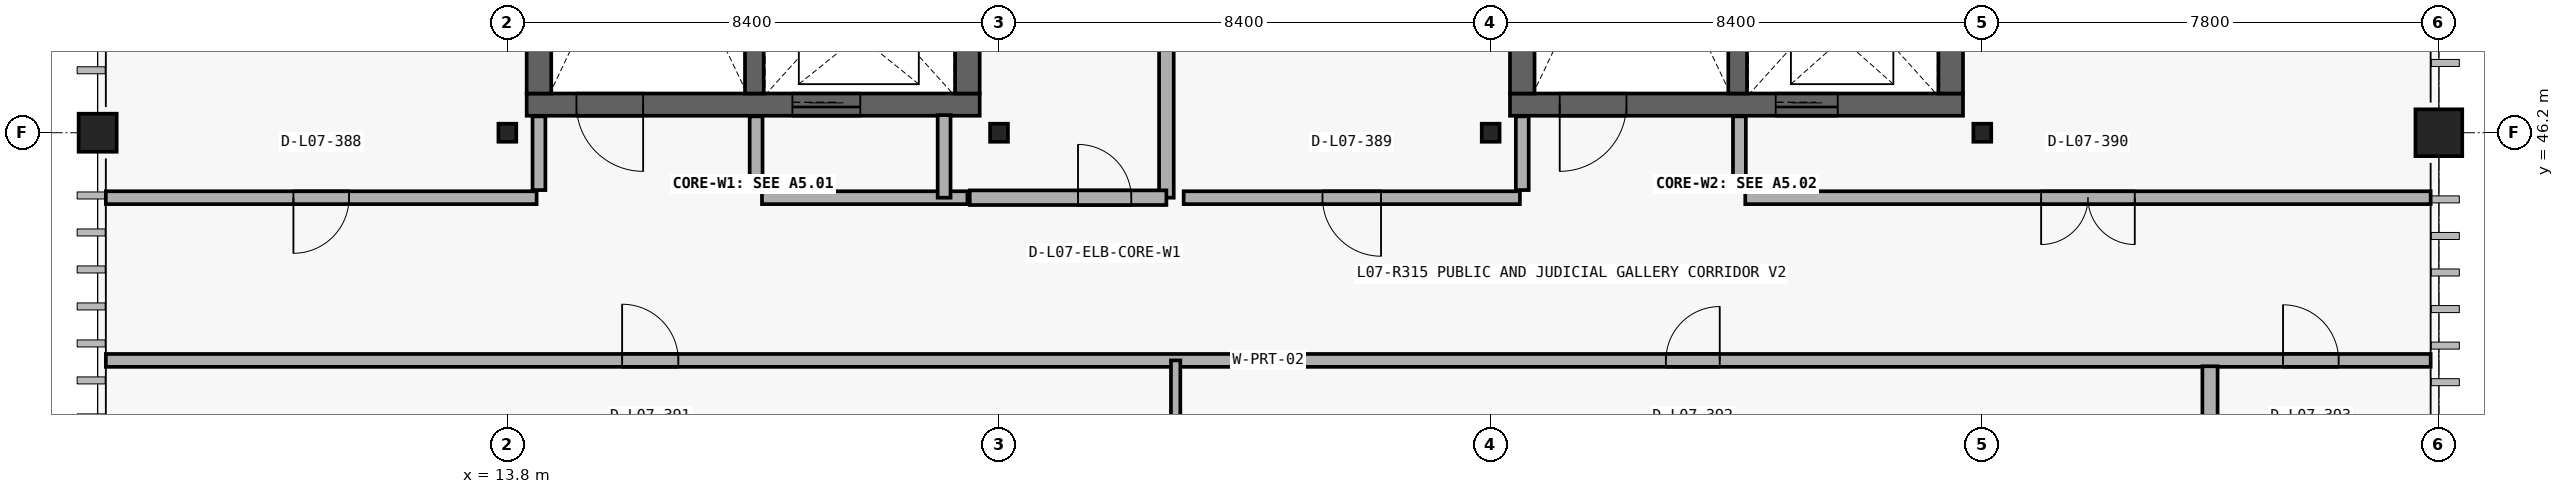
"""IFC4 building model, lengths in metres.
Left out: names, types, materials, properties, quantities, classifications, styles, units other than length and angle.
Written with IfcOpenShell. Run it as: python <this file> out.ifc"""

import sys

from ifc_helpers import new_model, si_unit, direction, frame, frame_2d, origin_with_axes, origin_2d_with_axis, place, context, subcontext, project, spatial, rectangle, circle, i_section, extrude, element, fill, save


model = new_model("IFC4")
c1 = context("Model", 3, precision=1e-05, world=origin_with_axes(), true_north=direction((0.0, 1.0)))
c2 = subcontext(c1, "Body", "Model", "MODEL_VIEW")
j1 = project(units=[si_unit("LENGTHUNIT", "METRE"), si_unit("PLANEANGLEUNIT", "RADIAN")], contexts=[c1])
p1 = place(None, origin_with_axes())
s1 = spatial("IfcSite", under=j1, at=p1, CompositionType="ELEMENT")
p2 = place(p1, origin_with_axes())
s2 = spatial("IfcBuilding", under=s1, at=p2, CompositionType="ELEMENT")
p3 = place(p2, frame((0.0, 0.0, 34.5), z_axis=(0.0, 0.0, 1.0), x_axis=(1.0, 0.0, 0.0)))
s3 = spatial("IfcBuildingStorey", under=s2, at=p3, CompositionType="ELEMENT", Elevation=34.5)
p4 = place(None, frame((14.13, 46.68, 34.5), z_axis=(0.0, 0.0, 1.0), x_axis=(1.0, 0.0, 0.0)))
e1 = element("IfcWall", 1, at=p4, inside=s3, PredefinedType="SHEAR", context=c2, shape_type="SweptSolid", body=[
    extrude(rectangle(XDim=7.74, YDim=0.38, at=frame_2d((3.87, 0.0), x_axis=(1.0, 0.0))), origin_with_axes(), (0.0, 0.0, 1.0), 4.5),
])
p5 = place(None, frame((15.55, 46.68, 34.5), z_axis=(0.0, 0.0, 1.0), x_axis=(1.0, 0.0, 0.0)))
e2 = element("IfcOpeningElement", 2, at=p5, cuts=e1, PredefinedType="OPENING", context=c2, shape_type="SweptSolid", body=[
    extrude(rectangle(XDim=1.14, YDim=2.18, at=frame_2d((0.0, 1.09), x_axis=(1.0, 0.0))), frame((0.0, 0.2, 0.0), z_axis=(0.0, -1.0, 0.0), x_axis=(1.0, 0.0, 0.0)), (0.0, 0.0, 1.0), 0.4),
])
p6 = place(None, frame((19.25, 46.68, 34.5), z_axis=(0.0, 0.0, 1.0), x_axis=(1.0, 0.0, 0.0)))
e3 = element("IfcOpeningElement", 3, at=p6, cuts=e1, PredefinedType="OPENING", context=c2, shape_type="SweptSolid", body=[
    extrude(rectangle(XDim=1.16, YDim=2.2, at=frame_2d((0.0, 1.1), x_axis=(1.0, 0.0))), frame((0.0, 0.2, 0.0), z_axis=(0.0, -1.0, 0.0), x_axis=(1.0, 0.0, 0.0)), (0.0, 0.0, 1.0), 0.4),
])
p7 = place(None, frame((21.66, 46.87, 34.5), z_axis=(0.0, 0.0, 1.0), x_axis=(0.0, 1.0, 0.0)))
e4 = element("IfcWall", 4, at=p7, inside=s3, PredefinedType="SHEAR", context=c2, shape_type="SweptSolid", body=[
    extrude(rectangle(XDim=7.06, YDim=0.42, at=frame_2d((3.53, 0.0), x_axis=(1.0, 0.0))), origin_with_axes(), (0.0, 0.0, 1.0), 4.5),
])
p8 = place(None, frame((21.66, 52.66, 34.5), z_axis=(0.0, 0.0, 1.0), x_axis=(0.0, 1.0, 0.0)))
e5 = element("IfcOpeningElement", 5, at=p8, cuts=e4, PredefinedType="OPENING", context=c2, shape_type="SweptSolid", body=[
    extrude(rectangle(XDim=1.16, YDim=2.2, at=frame_2d((0.0, 1.1), x_axis=(1.0, 0.0))), frame((0.0, 0.22, 0.0), z_axis=(0.0, -1.0, 0.0), x_axis=(1.0, 0.0, 0.0)), (0.0, 0.0, 1.0), 0.44),
])
p9 = place(None, frame((14.34, 53.93, 34.5), z_axis=(0.0, 0.0, 1.0), x_axis=(0.0, -1.0, 0.0)))
e6 = element("IfcWall", 6, at=p9, inside=s3, PredefinedType="SHEAR", context=c2, shape_type="SweptSolid", body=[
    extrude(rectangle(XDim=7.06, YDim=0.42, at=frame_2d((3.53, 0.0), x_axis=(1.0, 0.0))), origin_with_axes(), (0.0, 0.0, 1.0), 4.5),
])
p10 = place(None, frame((18.02, 46.87, 34.5), z_axis=(0.0, 0.0, 1.0), x_axis=(0.0, 1.0, 0.0)))
e7 = element("IfcWall", 7, at=p10, inside=s3, PredefinedType="SHEAR", context=c2, shape_type="SweptSolid", body=[
    extrude(rectangle(XDim=7.06, YDim=0.32, at=frame_2d((3.53, 0.0), x_axis=(1.0, 0.0))), origin_with_axes(), (0.0, 0.0, 1.0), 4.5),
])
p11 = place(None, frame((25.06, 45.09, 34.5), z_axis=(0.0, 0.0, 1.0), x_axis=(0.0, 1.0, 0.0)))
e8 = element("IfcWall", 8, at=p11, inside=s3, PredefinedType="PARTITIONING", context=c2, shape_type="SweptSolid", body=[
    extrude(rectangle(XDim=9.03, YDim=0.25, at=frame_2d((4.515, 0.0), x_axis=(1.0, 0.0))), origin_with_axes(), (0.0, 0.0, 1.0), 4.14),
])
p12 = place(None, frame((21.7, 45.09, 34.5), z_axis=(0.0, 0.0, 1.0), x_axis=(1.0, 0.0, 0.0)))
e9 = element("IfcWall", 9, at=p12, inside=s3, PredefinedType="PARTITIONING", context=c2, shape_type="SweptSolid", body=[
    extrude(rectangle(XDim=3.36, YDim=0.25, at=frame_2d((1.68, 0.0), x_axis=(1.0, 0.0))), origin_with_axes(), (0.0, 0.0, 1.0), 4.14),
])
p13 = place(None, frame((24.005, 45.09, 34.5), z_axis=(0.0, 0.0, 1.0), x_axis=(1.0, 0.0, 0.0)))
e10 = element("IfcOpeningElement", 10, at=p13, cuts=e9, PredefinedType="OPENING", context=c2, shape_type="SweptSolid", body=[
    extrude(rectangle(XDim=0.91, YDim=2.12, at=frame_2d((0.0, 1.06), x_axis=(1.0, 0.0))), frame((0.0, 0.135, 0.0), z_axis=(0.0, -1.0, 0.0), x_axis=(1.0, 0.0, 0.0)), (0.0, 0.0, 1.0), 0.27),
])
p14 = place(None, frame((30.93, 46.68, 34.5), z_axis=(0.0, 0.0, 1.0), x_axis=(1.0, 0.0, 0.0)))
e11 = element("IfcWall", 11, at=p14, inside=s3, PredefinedType="SHEAR", context=c2, shape_type="SweptSolid", body=[
    extrude(rectangle(XDim=7.74, YDim=0.38, at=frame_2d((3.87, 0.0), x_axis=(1.0, 0.0))), origin_with_axes(), (0.0, 0.0, 1.0), 4.5),
])
p15 = place(None, frame((32.35, 46.68, 34.5), z_axis=(0.0, 0.0, 1.0), x_axis=(1.0, 0.0, 0.0)))
e12 = element("IfcOpeningElement", 12, at=p15, cuts=e11, PredefinedType="OPENING", context=c2, shape_type="SweptSolid", body=[
    extrude(rectangle(XDim=1.14, YDim=2.18, at=frame_2d((0.0, 1.09), x_axis=(1.0, 0.0))), frame((0.0, 0.2, 0.0), z_axis=(0.0, -1.0, 0.0), x_axis=(1.0, 0.0, 0.0)), (0.0, 0.0, 1.0), 0.4),
])
p16 = place(None, frame((36.0, 46.68, 34.5), z_axis=(0.0, 0.0, 1.0), x_axis=(1.0, 0.0, 0.0)))
e13 = element("IfcOpeningElement", 13, at=p16, cuts=e11, PredefinedType="OPENING", context=c2, shape_type="SweptSolid", body=[
    extrude(rectangle(XDim=1.06, YDim=2.16, at=frame_2d((0.0, 1.08), x_axis=(1.0, 0.0))), frame((0.0, 0.2, 0.0), z_axis=(0.0, -1.0, 0.0), x_axis=(1.0, 0.0, 0.0)), (0.0, 0.0, 1.0), 0.4),
])
for number, where, z_axis, x_axis in (
    (14, (38.46, 46.87, 34.5), (0.0, 0.0, 1.0), (0.0, 1.0, 0.0)),
    (15, (31.14, 53.93, 34.5), (0.0, 0.0, 1.0), (0.0, -1.0, 0.0)),
):
    element("IfcWall", number, at=place(None, frame(where, z_axis=z_axis, x_axis=x_axis)), inside=s3, PredefinedType="SHEAR", context=c2, shape_type="SweptSolid", body=[
        extrude(rectangle(XDim=7.06, YDim=0.42, at=frame_2d((3.53, 0.0), x_axis=(1.0, 0.0))), origin_with_axes(), (0.0, 0.0, 1.0), 4.5),
    ])
p17 = place(None, frame((34.82, 46.87, 34.5), z_axis=(0.0, 0.0, 1.0), x_axis=(0.0, 1.0, 0.0)))
e16 = element("IfcWall", 16, at=p17, inside=s3, PredefinedType="SHEAR", context=c2, shape_type="SweptSolid", body=[
    extrude(rectangle(XDim=7.06, YDim=0.32, at=frame_2d((3.53, 0.0), x_axis=(1.0, 0.0))), origin_with_axes(), (0.0, 0.0, 1.0), 4.5),
])
for number, where, z_axis, x_axis in (
    (17, (14.34, 45.22, 34.5), (0.0, 0.0, 1.0), (0.0, 1.0, 0.0)),
    (18, (18.05, 45.22, 34.5), (0.0, 0.0, 1.0), (0.0, 1.0, 0.0)),
    (19, (31.14, 45.22, 34.5), (0.0, 0.0, 1.0), (0.0, 1.0, 0.0)),
    (20, (34.85, 45.22, 34.5), (0.0, 0.0, 1.0), (0.0, 1.0, 0.0)),
):
    element("IfcWall", number, at=place(None, frame(where, z_axis=z_axis, x_axis=x_axis)), inside=s3, PredefinedType="PARTITIONING", context=c2, shape_type="SweptSolid", body=[
        extrude(rectangle(XDim=1.26, YDim=0.22, at=frame_2d((0.63, 0.0), x_axis=(1.0, 0.0))), origin_with_axes(), (0.0, 0.0, 1.0), 4.14),
    ])
p18 = place(None, frame((6.94, 45.09, 34.5), z_axis=(0.0, 0.0, 1.0), x_axis=(1.0, 0.0, 0.0)))
e21 = element("IfcWall", 21, at=p18, inside=s3, PredefinedType="PARTITIONING", context=c2, shape_type="SweptSolid", body=[
    extrude(rectangle(XDim=7.36, YDim=0.22, at=frame_2d((3.68, 0.0), x_axis=(1.0, 0.0))), origin_with_axes(), (0.0, 0.0, 1.0), 4.14),
])
p19 = place(None, frame((10.62, 45.09, 34.5), z_axis=(0.0, 0.0, 1.0), x_axis=(1.0, 0.0, 0.0)))
e22 = element("IfcOpeningElement", 22, at=p19, cuts=e21, PredefinedType="OPENING", context=c2, shape_type="SweptSolid", body=[
    extrude(rectangle(XDim=0.95, YDim=2.16, at=frame_2d((0.0, 1.08), x_axis=(1.0, 0.0))), frame((0.0, 0.12, 0.0), z_axis=(0.0, -1.0, 0.0), x_axis=(1.0, 0.0, 0.0)), (0.0, 0.0, 1.0), 0.24),
])
p20 = place(None, frame((18.15, 45.09, 34.5), z_axis=(0.0, 0.0, 1.0), x_axis=(1.0, 0.0, 0.0)))
e23 = element("IfcWall", 23, at=p20, inside=s3, PredefinedType="PARTITIONING", context=c2, shape_type="SweptSolid", body=[
    extrude(rectangle(XDim=3.51, YDim=0.22, at=frame_2d((1.755, 0.0), x_axis=(1.0, 0.0))), origin_with_axes(), (0.0, 0.0, 1.0), 4.14),
])
p21 = place(None, frame((25.355, 45.09, 34.5), z_axis=(0.0, 0.0, 1.0), x_axis=(1.0, 0.0, 0.0)))
e24 = element("IfcWall", 24, at=p21, inside=s3, PredefinedType="PARTITIONING", context=c2, shape_type="SweptSolid", body=[
    extrude(rectangle(XDim=5.745, YDim=0.22, at=frame_2d((2.873, 0.0), x_axis=(1.0, 0.0))), origin_with_axes(), (0.0, 0.0, 1.0), 4.14),
])
p22 = place(None, frame((28.227, 45.09, 34.5), z_axis=(0.0, 0.0, 1.0), x_axis=(1.0, 0.0, 0.0)))
e25 = element("IfcOpeningElement", 25, at=p22, cuts=e24, PredefinedType="OPENING", context=c2, shape_type="SweptSolid", body=[
    extrude(rectangle(XDim=1.0, YDim=2.28, at=frame_2d((0.0, 1.14), x_axis=(1.0, 0.0))), frame((0.0, 0.12, 0.0), z_axis=(0.0, -1.0, 0.0), x_axis=(1.0, 0.0, 0.0)), (0.0, 0.0, 1.0), 0.24),
])
p23 = place(None, frame((34.95, 45.09, 34.5), z_axis=(0.0, 0.0, 1.0), x_axis=(1.0, 0.0, 0.0)))
e26 = element("IfcWall", 26, at=p23, inside=s3, PredefinedType="PARTITIONING", context=c2, shape_type="SweptSolid", body=[
    extrude(rectangle(XDim=11.71, YDim=0.22, at=frame_2d((5.855, 0.0), x_axis=(1.0, 0.0))), origin_with_axes(), (0.0, 0.0, 1.0), 4.14),
])
p24 = place(None, frame((40.805, 45.09, 34.5), z_axis=(0.0, 0.0, 1.0), x_axis=(1.0, 0.0, 0.0)))
e27 = element("IfcOpeningElement", 27, at=p24, cuts=e26, PredefinedType="OPENING", context=c2, shape_type="SweptSolid", body=[
    extrude(rectangle(XDim=1.6, YDim=2.32, at=frame_2d((0.0, 1.16), x_axis=(1.0, 0.0))), frame((0.0, 0.12, 0.0), z_axis=(0.0, -1.0, 0.0), x_axis=(1.0, 0.0, 0.0)), (0.0, 0.0, 1.0), 0.24),
])
p25 = place(None, frame((6.94, 42.31, 34.5), z_axis=(0.0, 0.0, 1.0), x_axis=(1.0, 0.0, 0.0)))
e28 = element("IfcWall", 28, at=p25, inside=s3, PredefinedType="PARTITIONING", context=c2, shape_type="SweptSolid", body=[
    extrude(rectangle(XDim=39.72, YDim=0.22, at=frame_2d((19.86, 0.0), x_axis=(1.0, 0.0))), origin_with_axes(), (0.0, 0.0, 1.0), 4.14),
])
p26 = place(None, frame((16.241, 42.31, 34.5), z_axis=(0.0, 0.0, 1.0), x_axis=(1.0, 0.0, 0.0)))
e29 = element("IfcOpeningElement", 29, at=p26, cuts=e28, PredefinedType="OPENING", context=c2, shape_type="SweptSolid", body=[
    extrude(rectangle(XDim=0.96, YDim=2.2, at=frame_2d((0.0, 1.1), x_axis=(1.0, 0.0))), frame((0.0, 0.12, 0.0), z_axis=(0.0, -1.0, 0.0), x_axis=(1.0, 0.0, 0.0)), (0.0, 0.0, 1.0), 0.24),
])
p27 = place(None, frame((34.054, 42.31, 34.5), z_axis=(0.0, 0.0, 1.0), x_axis=(1.0, 0.0, 0.0)))
e30 = element("IfcOpeningElement", 30, at=p27, cuts=e28, PredefinedType="OPENING", context=c2, shape_type="SweptSolid", body=[
    extrude(rectangle(XDim=0.92, YDim=2.14, at=frame_2d((0.0, 1.07), x_axis=(1.0, 0.0))), frame((0.0, 0.12, 0.0), z_axis=(0.0, -1.0, 0.0), x_axis=(1.0, 0.0, 0.0)), (0.0, 0.0, 1.0), 0.24),
])
p28 = place(None, frame((44.613, 42.31, 34.5), z_axis=(0.0, 0.0, 1.0), x_axis=(1.0, 0.0, 0.0)))
e31 = element("IfcOpeningElement", 31, at=p28, cuts=e28, PredefinedType="OPENING", context=c2, shape_type="SweptSolid", body=[
    extrude(rectangle(XDim=0.95, YDim=2.1, at=frame_2d((0.0, 1.05), x_axis=(1.0, 0.0))), frame((0.0, 0.12, 0.0), z_axis=(0.0, -1.0, 0.0), x_axis=(1.0, 0.0, 0.0)), (0.0, 0.0, 1.0), 0.24),
])
p29 = place(None, frame((42.89, 39.18, 34.5), z_axis=(0.0, 0.0, 1.0), x_axis=(0.0, 1.0, 0.0)))
e32 = element("IfcWall", 32, at=p29, inside=s3, PredefinedType="PLUMBINGWALL", context=c2, shape_type="SweptSolid", body=[
    extrude(rectangle(XDim=3.03, YDim=0.26, at=frame_2d((1.515, 0.0), x_axis=(1.0, 0.0))), origin_with_axes(), (0.0, 0.0, 1.0), 4.14),
])
p30 = place(None, frame((21.262, 45.09, 34.5), z_axis=(0.0, 0.0, 1.0), x_axis=(0.0, 1.0, 0.0)))
e33 = element("IfcWall", 33, at=p30, inside=s3, PredefinedType="PARTITIONING", context=c2, shape_type="SweptSolid", body=[
    extrude(rectangle(XDim=1.41, YDim=0.22, at=frame_2d((0.705, 0.0), x_axis=(1.0, 0.0))), origin_with_axes(), (0.0, 0.0, 1.0), 4.14),
])
p31 = place(None, frame((25.218, 39.14, 34.5), z_axis=(0.0, 0.0, 1.0), x_axis=(0.0, 1.0, 0.0)))
e34 = element("IfcWall", 34, at=p31, inside=s3, PredefinedType="PARTITIONING", context=c2, shape_type="SweptSolid", body=[
    extrude(rectangle(XDim=3.17, YDim=0.16, at=frame_2d((1.585, 0.0), x_axis=(1.0, 0.0))), origin_with_axes(), (0.0, 0.0, 1.0), 4.14),
])
p32 = place(None, frame((6.8, 46.2, 34.5), z_axis=(0.0, 0.0, 1.0), x_axis=(1.0, 0.0, 0.0)))
e35 = element("IfcColumn", 35, at=p32, inside=s3, PredefinedType="COLUMN", context=c2, shape_type="SweptSolid", body=[
    extrude(circle(Radius=0.325, at=origin_2d_with_axis()), origin_with_axes(), (0.0, 0.0, 1.0), 4.5),
])
for number, where, z_axis, x_axis in (
    (36, (13.8, 46.2, 34.5), (0.0, 0.0, 1.0), (1.0, 0.0, 0.0)),
    (37, (22.2, 46.2, 34.5), (0.0, 0.0, 1.0), (1.0, 0.0, 0.0)),
    (38, (30.6, 46.2, 34.5), (0.0, 0.0, 1.0), (1.0, 0.0, 0.0)),
    (39, (39.0, 46.2, 34.5), (0.0, 0.0, 1.0), (1.0, 0.0, 0.0)),
):
    element("IfcColumn", number, at=place(None, frame(where, z_axis=z_axis, x_axis=x_axis)), inside=s3, PredefinedType="COLUMN", context=c2, shape_type="SweptSolid", body=[
        extrude(i_section(OverallWidth=0.305, OverallDepth=0.308, WebThickness=0.01, FlangeThickness=0.015, at=origin_2d_with_axis()), origin_with_axes(), (0.0, 0.0, 1.0), 4.5),
    ])
p33 = place(None, frame((46.8, 46.2, 34.5), z_axis=(0.0, 0.0, 1.0), x_axis=(1.0, 0.0, 0.0)))
e40 = element("IfcColumn", 40, at=p33, inside=s3, PredefinedType="COLUMN", context=c2, shape_type="SweptSolid", body=[
    extrude(circle(Radius=0.4, at=origin_2d_with_axis()), origin_with_axes(), (0.0, 0.0, 1.0), 4.5),
])
p34 = place(None, frame((15.55, 46.68, 34.5), z_axis=(0.0, 0.0, 1.0), x_axis=(-1.0, 0.0, 0.0)))
e41 = element("IfcDoor", 41, at=p34, inside=s3, OperationType="SINGLE_SWING_RIGHT", PredefinedType="DOOR", context=c2, shape_type="SweptSolid", body=[
    extrude(rectangle(XDim=1.14, YDim=2.18, at=frame_2d((0.0, 1.09), x_axis=(1.0, 0.0))), frame((0.0, 0.04, 0.0), z_axis=(0.0, -1.0, 0.0), x_axis=(1.0, 0.0, 0.0)), (0.0, 0.0, 1.0), 0.08),
])
fill(e2, e41)
p35 = place(None, frame((19.25, 46.68, 34.5), z_axis=(0.0, 0.0, 1.0), x_axis=(-1.0, 0.0, 0.0)))
e42 = element("IfcDoor", 42, at=p35, inside=s3, OperationType="SLIDING_TO_LEFT", PredefinedType="DOOR", context=c2, shape_type="SweptSolid", body=[
    extrude(rectangle(XDim=1.16, YDim=2.2, at=frame_2d((0.0, 1.1), x_axis=(1.0, 0.0))), frame((0.0, 0.04, 0.0), z_axis=(0.0, -1.0, 0.0), x_axis=(1.0, 0.0, 0.0)), (0.0, 0.0, 1.0), 0.08),
])
fill(e3, e42)
p36 = place(None, frame((24.005, 45.09, 34.5), z_axis=(0.0, 0.0, 1.0), x_axis=(1.0, 0.0, 0.0)))
e43 = element("IfcDoor", 43, at=p36, inside=s3, OperationType="SINGLE_SWING_LEFT", PredefinedType="DOOR", context=c2, shape_type="SweptSolid", body=[
    extrude(rectangle(XDim=0.91, YDim=2.12, at=frame_2d((0.0, 1.06), x_axis=(1.0, 0.0))), frame((0.0, 0.04, 0.0), z_axis=(0.0, -1.0, 0.0), x_axis=(1.0, 0.0, 0.0)), (0.0, 0.0, 1.0), 0.08),
])
fill(e10, e43)
p37 = place(None, frame((32.35, 46.68, 34.5), z_axis=(0.0, 0.0, 1.0), x_axis=(-1.0, 0.0, 0.0)))
e44 = element("IfcDoor", 44, at=p37, inside=s3, OperationType="SINGLE_SWING_LEFT", PredefinedType="DOOR", context=c2, shape_type="SweptSolid", body=[
    extrude(rectangle(XDim=1.14, YDim=2.18, at=frame_2d((0.0, 1.09), x_axis=(1.0, 0.0))), frame((0.0, 0.04, 0.0), z_axis=(0.0, -1.0, 0.0), x_axis=(1.0, 0.0, 0.0)), (0.0, 0.0, 1.0), 0.08),
])
fill(e12, e44)
p38 = place(None, frame((36.0, 46.68, 34.5), z_axis=(0.0, 0.0, 1.0), x_axis=(-1.0, 0.0, 0.0)))
e45 = element("IfcDoor", 45, at=p38, inside=s3, OperationType="SLIDING_TO_LEFT", PredefinedType="DOOR", context=c2, shape_type="SweptSolid", body=[
    extrude(rectangle(XDim=1.06, YDim=2.16, at=frame_2d((0.0, 1.08), x_axis=(1.0, 0.0))), frame((0.0, 0.04, 0.0), z_axis=(0.0, -1.0, 0.0), x_axis=(1.0, 0.0, 0.0)), (0.0, 0.0, 1.0), 0.08),
])
fill(e13, e45)
p39 = place(None, frame((10.62, 45.09, 34.5), z_axis=(0.0, 0.0, 1.0), x_axis=(-1.0, 0.0, 0.0)))
e46 = element("IfcDoor", 46, at=p39, inside=s3, OperationType="SINGLE_SWING_LEFT", PredefinedType="DOOR", context=c2, shape_type="SweptSolid", body=[
    extrude(rectangle(XDim=0.95, YDim=2.16, at=frame_2d((0.0, 1.08), x_axis=(1.0, 0.0))), frame((0.0, 0.04, 0.0), z_axis=(0.0, -1.0, 0.0), x_axis=(1.0, 0.0, 0.0)), (0.0, 0.0, 1.0), 0.08),
])
fill(e22, e46)
p40 = place(None, frame((28.227, 45.09, 34.5), z_axis=(0.0, 0.0, 1.0), x_axis=(-1.0, 0.0, 0.0)))
e47 = element("IfcDoor", 47, at=p40, inside=s3, OperationType="SINGLE_SWING_RIGHT", PredefinedType="DOOR", context=c2, shape_type="SweptSolid", body=[
    extrude(rectangle(XDim=1.0, YDim=2.28, at=frame_2d((0.0, 1.14), x_axis=(1.0, 0.0))), frame((0.0, 0.04, 0.0), z_axis=(0.0, -1.0, 0.0), x_axis=(1.0, 0.0, 0.0)), (0.0, 0.0, 1.0), 0.08),
])
fill(e25, e47)
p41 = place(None, frame((40.805, 45.09, 34.5), z_axis=(0.0, 0.0, 1.0), x_axis=(-1.0, 0.0, 0.0)))
e48 = element("IfcDoor", 48, at=p41, inside=s3, OperationType="DOUBLE_DOOR_SINGLE_SWING", PredefinedType="DOOR", context=c2, shape_type="SweptSolid", body=[
    extrude(rectangle(XDim=1.6, YDim=2.32, at=frame_2d((0.0, 1.16), x_axis=(1.0, 0.0))), frame((0.0, 0.04, 0.0), z_axis=(0.0, -1.0, 0.0), x_axis=(1.0, 0.0, 0.0)), (0.0, 0.0, 1.0), 0.08),
])
fill(e27, e48)
p42 = place(None, frame((16.241, 42.31, 34.5), z_axis=(0.0, 0.0, 1.0), x_axis=(1.0, 0.0, 0.0)))
e49 = element("IfcDoor", 49, at=p42, inside=s3, OperationType="SINGLE_SWING_LEFT", PredefinedType="DOOR", context=c2, shape_type="SweptSolid", body=[
    extrude(rectangle(XDim=0.96, YDim=2.2, at=frame_2d((0.0, 1.1), x_axis=(1.0, 0.0))), frame((0.0, 0.04, 0.0), z_axis=(0.0, -1.0, 0.0), x_axis=(1.0, 0.0, 0.0)), (0.0, 0.0, 1.0), 0.08),
])
fill(e29, e49)
p43 = place(None, frame((34.054, 42.31, 34.5), z_axis=(0.0, 0.0, 1.0), x_axis=(1.0, 0.0, 0.0)))
e50 = element("IfcDoor", 50, at=p43, inside=s3, OperationType="SINGLE_SWING_RIGHT", PredefinedType="DOOR", context=c2, shape_type="SweptSolid", body=[
    extrude(rectangle(XDim=0.92, YDim=2.14, at=frame_2d((0.0, 1.07), x_axis=(1.0, 0.0))), frame((0.0, 0.04, 0.0), z_axis=(0.0, -1.0, 0.0), x_axis=(1.0, 0.0, 0.0)), (0.0, 0.0, 1.0), 0.08),
])
fill(e30, e50)
p44 = place(None, frame((44.613, 42.31, 34.5), z_axis=(0.0, 0.0, 1.0), x_axis=(1.0, 0.0, 0.0)))
e51 = element("IfcDoor", 51, at=p44, inside=s3, OperationType="SINGLE_SWING_LEFT", PredefinedType="DOOR", context=c2, shape_type="SweptSolid", body=[
    extrude(rectangle(XDim=0.95, YDim=2.1, at=frame_2d((0.0, 1.05), x_axis=(1.0, 0.0))), frame((0.0, 0.04, 0.0), z_axis=(0.0, -1.0, 0.0), x_axis=(1.0, 0.0, 0.0)), (0.0, 0.0, 1.0), 0.08),
])
fill(e31, e51)
save(model, sys.argv[1])
